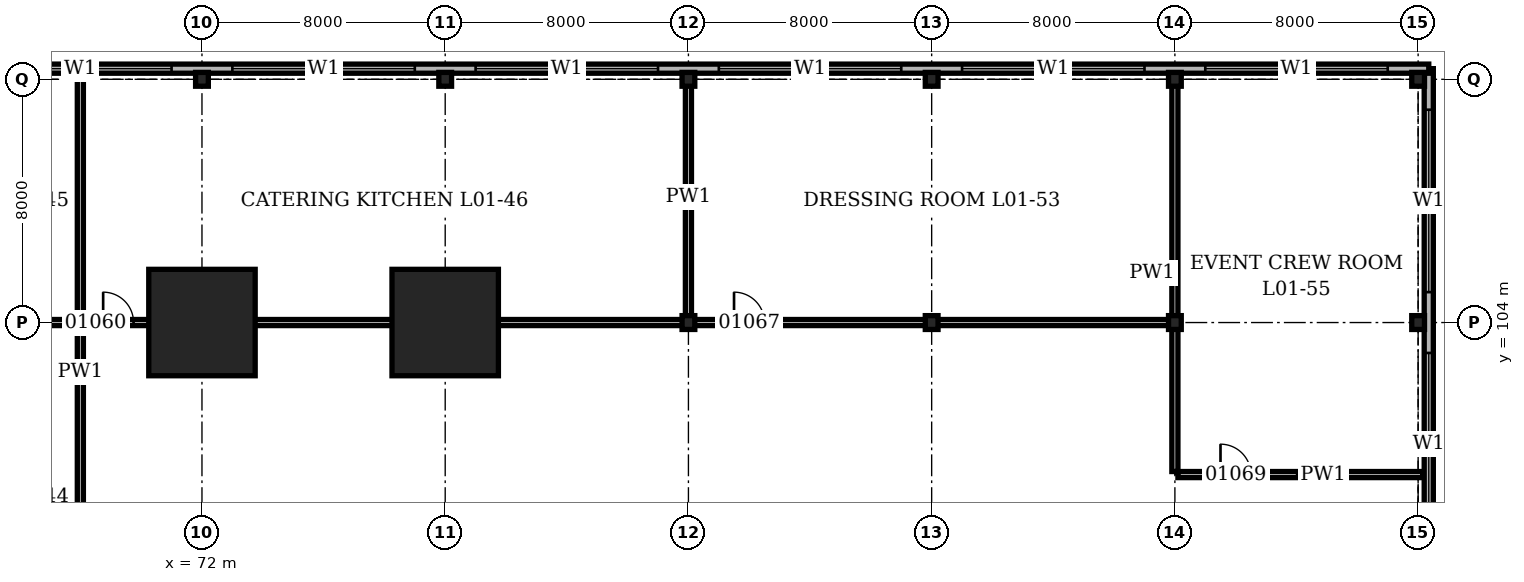
"""IFC4 building model, lengths in metres.
Left out: names, types, materials, properties, quantities, classifications, styles, units other than length and angle.
Written with IfcOpenShell. Run it as: python <this file> out.ifc"""

import sys

from ifc_helpers import new_model, si_unit, direction, frame, frame_2d, origin, origin_2d, place, context, subcontext, project, spatial, rectangle, hollow_rectangle, i_section, extrude, element, fill, save


model = new_model("IFC4")
c1 = context("Model", 3, precision=1e-05, world=origin(), true_north=direction((0.0, 1.0)))
c2 = subcontext(c1, "Body", "Model", "MODEL_VIEW")
j1 = project(units=[si_unit("LENGTHUNIT", "METRE"), si_unit("PLANEANGLEUNIT", "RADIAN")], contexts=[c1])
p1 = place(None, origin())
s1 = spatial("IfcSite", under=j1, at=p1, CompositionType="ELEMENT")
p2 = place(p1, origin())
s2 = spatial("IfcBuilding", under=s1, at=p2, CompositionType="ELEMENT")
p3 = place(p2, frame((0.0, 0.0, 4.9)))
s3 = spatial("IfcBuildingStorey", under=s2, at=p3, CompositionType="ELEMENT", Elevation=4.9)
p4 = place(p3, frame((72.0, 104.0, 0.0), z_axis=(0.0, 0.0, 1.0), x_axis=(1.0, 0.0, 0.0)))
e1 = element("IfcColumn", 1, at=p4, inside=s3, PredefinedType="COLUMN", context=c2, shape_type="SweptSolid", body=[
    extrude(hollow_rectangle(XDim=3.5, YDim=3.5, WallThickness=0.5, at=origin_2d()), origin(), (0.0, 0.0, 1.0), 5.0),
])
p5 = place(p3, frame((72.0, 112.0, 0.0), z_axis=(0.0, 0.0, 1.0), x_axis=(1.0, 0.0, 0.0)))
e2 = element("IfcColumn", 2, at=p5, inside=s3, PredefinedType="COLUMN", context=c2, shape_type="SweptSolid", body=[
    extrude(i_section(OverallWidth=0.419, OverallDepth=0.455, WebThickness=0.042, FlangeThickness=0.068, at=origin_2d()), origin(), (0.0, 0.0, 1.0), 5.0),
])
p6 = place(p3, frame((80.0, 104.0, 0.0), z_axis=(0.0, 0.0, 1.0), x_axis=(1.0, 0.0, 0.0)))
e3 = element("IfcColumn", 3, at=p6, inside=s3, PredefinedType="COLUMN", context=c2, shape_type="SweptSolid", body=[
    extrude(hollow_rectangle(XDim=3.5, YDim=3.5, WallThickness=0.5, at=origin_2d()), origin(), (0.0, 0.0, 1.0), 5.0),
])
for number, where, z_axis, x_axis in (
    (4, (80.0, 112.0, 0.0), (0.0, 0.0, 1.0), (1.0, 0.0, 0.0)),
    (5, (88.0, 104.0, 0.0), (0.0, 0.0, 1.0), (1.0, 0.0, 0.0)),
    (6, (88.0, 112.0, 0.0), (0.0, 0.0, 1.0), (1.0, 0.0, 0.0)),
    (7, (96.0, 104.0, 0.0), (0.0, 0.0, 1.0), (1.0, 0.0, 0.0)),
    (8, (96.0, 112.0, 0.0), (0.0, 0.0, 1.0), (1.0, 0.0, 0.0)),
    (9, (104.0, 104.0, 0.0), (0.0, 0.0, 1.0), (1.0, 0.0, 0.0)),
    (10, (104.0, 112.0, 0.0), (0.0, 0.0, 1.0), (1.0, 0.0, 0.0)),
    (11, (112.0, 104.0, 0.0), (0.0, 0.0, 1.0), (1.0, 0.0, 0.0)),
    (12, (112.0, 112.0, 0.0), (0.0, 0.0, 1.0), (1.0, 0.0, 0.0)),
):
    element("IfcColumn", number, at=place(p3, frame(where, z_axis=z_axis, x_axis=x_axis)), inside=s3, PredefinedType="COLUMN", context=c2, shape_type="SweptSolid", body=[
        extrude(i_section(OverallWidth=0.419, OverallDepth=0.455, WebThickness=0.042, FlangeThickness=0.068, at=origin_2d()), origin(), (0.0, 0.0, 1.0), 5.0),
    ])
p7 = place(p3, frame((112.35, -0.35, 0.0), z_axis=(0.0, 0.0, 1.0), x_axis=(0.0, 1.0, 0.0)))
e13 = element("IfcWall", 13, at=p7, inside=s3, PredefinedType="SOLIDWALL", context=c2, shape_type="SweptSolid", body=[
    extrude(rectangle(XDim=112.7, YDim=0.3, at=frame_2d((56.35, 0.0))), origin(), (0.0, 0.0, 1.0), 5.0),
])
p8 = place(p7, frame((1.35, 0.0, 1.0)))
e14 = element("IfcOpeningElement", 14, at=p8, cuts=e13, PredefinedType="OPENING", context=c2, shape_type="SweptSolid", body=[
    extrude(rectangle(XDim=6.0, YDim=1.5, at=frame_2d((3.0, 0.75))), frame((0.0, 0.16, 0.0), z_axis=(0.0, -1.0, 0.0), x_axis=(1.0, 0.0, 0.0)), (0.0, 0.0, 1.0), 0.32),
])
p9 = place(p7, frame((9.35, 0.0, 1.0)))
e15 = element("IfcOpeningElement", 15, at=p9, cuts=e13, PredefinedType="OPENING", context=c2, shape_type="SweptSolid", body=[
    extrude(rectangle(XDim=6.0, YDim=1.5, at=frame_2d((3.0, 0.75))), frame((0.0, 0.16, 0.0), z_axis=(0.0, -1.0, 0.0), x_axis=(1.0, 0.0, 0.0)), (0.0, 0.0, 1.0), 0.32),
])
p10 = place(p7, frame((17.35, 0.0, 1.0)))
e16 = element("IfcOpeningElement", 16, at=p10, cuts=e13, PredefinedType="OPENING", context=c2, shape_type="SweptSolid", body=[
    extrude(rectangle(XDim=6.0, YDim=1.5, at=frame_2d((3.0, 0.75))), frame((0.0, 0.16, 0.0), z_axis=(0.0, -1.0, 0.0), x_axis=(1.0, 0.0, 0.0)), (0.0, 0.0, 1.0), 0.32),
])
p11 = place(p7, frame((25.35, 0.0, 1.0)))
e17 = element("IfcOpeningElement", 17, at=p11, cuts=e13, PredefinedType="OPENING", context=c2, shape_type="SweptSolid", body=[
    extrude(rectangle(XDim=6.0, YDim=1.5, at=frame_2d((3.0, 0.75))), frame((0.0, 0.16, 0.0), z_axis=(0.0, -1.0, 0.0), x_axis=(1.0, 0.0, 0.0)), (0.0, 0.0, 1.0), 0.32),
])
p12 = place(p7, frame((33.35, 0.0, 1.0)))
e18 = element("IfcOpeningElement", 18, at=p12, cuts=e13, PredefinedType="OPENING", context=c2, shape_type="SweptSolid", body=[
    extrude(rectangle(XDim=6.0, YDim=1.5, at=frame_2d((3.0, 0.75))), frame((0.0, 0.16, 0.0), z_axis=(0.0, -1.0, 0.0), x_axis=(1.0, 0.0, 0.0)), (0.0, 0.0, 1.0), 0.32),
])
p13 = place(p7, frame((41.35, 0.0, 1.0)))
e19 = element("IfcOpeningElement", 19, at=p13, cuts=e13, PredefinedType="OPENING", context=c2, shape_type="SweptSolid", body=[
    extrude(rectangle(XDim=6.0, YDim=1.5, at=frame_2d((3.0, 0.75))), frame((0.0, 0.16, 0.0), z_axis=(0.0, -1.0, 0.0), x_axis=(1.0, 0.0, 0.0)), (0.0, 0.0, 1.0), 0.32),
])
p14 = place(p7, frame((49.35, 0.0, 1.0)))
e20 = element("IfcOpeningElement", 20, at=p14, cuts=e13, PredefinedType="OPENING", context=c2, shape_type="SweptSolid", body=[
    extrude(rectangle(XDim=6.0, YDim=1.5, at=frame_2d((3.0, 0.75))), frame((0.0, 0.16, 0.0), z_axis=(0.0, -1.0, 0.0), x_axis=(1.0, 0.0, 0.0)), (0.0, 0.0, 1.0), 0.32),
])
p15 = place(p7, frame((57.35, 0.0, 1.0)))
e21 = element("IfcOpeningElement", 21, at=p15, cuts=e13, PredefinedType="OPENING", context=c2, shape_type="SweptSolid", body=[
    extrude(rectangle(XDim=6.0, YDim=1.5, at=frame_2d((3.0, 0.75))), frame((0.0, 0.16, 0.0), z_axis=(0.0, -1.0, 0.0), x_axis=(1.0, 0.0, 0.0)), (0.0, 0.0, 1.0), 0.32),
])
p16 = place(p7, frame((65.35, 0.0, 1.0)))
e22 = element("IfcOpeningElement", 22, at=p16, cuts=e13, PredefinedType="OPENING", context=c2, shape_type="SweptSolid", body=[
    extrude(rectangle(XDim=6.0, YDim=1.5, at=frame_2d((3.0, 0.75))), frame((0.0, 0.16, 0.0), z_axis=(0.0, -1.0, 0.0), x_axis=(1.0, 0.0, 0.0)), (0.0, 0.0, 1.0), 0.32),
])
p17 = place(p7, frame((73.35, 0.0, 1.0)))
e23 = element("IfcOpeningElement", 23, at=p17, cuts=e13, PredefinedType="OPENING", context=c2, shape_type="SweptSolid", body=[
    extrude(rectangle(XDim=6.0, YDim=1.5, at=frame_2d((3.0, 0.75))), frame((0.0, 0.16, 0.0), z_axis=(0.0, -1.0, 0.0), x_axis=(1.0, 0.0, 0.0)), (0.0, 0.0, 1.0), 0.32),
])
p18 = place(p7, frame((81.35, 0.0, 1.0)))
e24 = element("IfcOpeningElement", 24, at=p18, cuts=e13, PredefinedType="OPENING", context=c2, shape_type="SweptSolid", body=[
    extrude(rectangle(XDim=6.0, YDim=1.5, at=frame_2d((3.0, 0.75))), frame((0.0, 0.16, 0.0), z_axis=(0.0, -1.0, 0.0), x_axis=(1.0, 0.0, 0.0)), (0.0, 0.0, 1.0), 0.32),
])
p19 = place(p7, frame((89.35, 0.0, 1.0)))
e25 = element("IfcOpeningElement", 25, at=p19, cuts=e13, PredefinedType="OPENING", context=c2, shape_type="SweptSolid", body=[
    extrude(rectangle(XDim=6.0, YDim=1.5, at=frame_2d((3.0, 0.75))), frame((0.0, 0.16, 0.0), z_axis=(0.0, -1.0, 0.0), x_axis=(1.0, 0.0, 0.0)), (0.0, 0.0, 1.0), 0.32),
])
p20 = place(p7, frame((97.35, 0.0, 1.0)))
e26 = element("IfcOpeningElement", 26, at=p20, cuts=e13, PredefinedType="OPENING", context=c2, shape_type="SweptSolid", body=[
    extrude(rectangle(XDim=6.0, YDim=1.5, at=frame_2d((3.0, 0.75))), frame((0.0, 0.16, 0.0), z_axis=(0.0, -1.0, 0.0), x_axis=(1.0, 0.0, 0.0)), (0.0, 0.0, 1.0), 0.32),
])
p21 = place(p7, frame((105.35, 0.0, 1.0)))
e27 = element("IfcOpeningElement", 27, at=p21, cuts=e13, PredefinedType="OPENING", context=c2, shape_type="SweptSolid", body=[
    extrude(rectangle(XDim=6.0, YDim=1.5, at=frame_2d((3.0, 0.75))), frame((0.0, 0.16, 0.0), z_axis=(0.0, -1.0, 0.0), x_axis=(1.0, 0.0, 0.0)), (0.0, 0.0, 1.0), 0.32),
])
p22 = place(p3, frame((112.35, 112.35, 0.0), z_axis=(0.0, 0.0, 1.0), x_axis=(-1.0, 0.0, 0.0)))
e28 = element("IfcWall", 28, at=p22, inside=s3, PredefinedType="SOLIDWALL", context=c2, shape_type="SweptSolid", body=[
    extrude(rectangle(XDim=112.7, YDim=0.3, at=frame_2d((56.35, 0.0))), origin(), (0.0, 0.0, 1.0), 5.0),
])
p23 = place(p22, frame((1.35, 0.0, 1.0)))
e29 = element("IfcOpeningElement", 29, at=p23, cuts=e28, PredefinedType="OPENING", context=c2, shape_type="SweptSolid", body=[
    extrude(rectangle(XDim=6.0, YDim=1.5, at=frame_2d((3.0, 0.75))), frame((0.0, 0.16, 0.0), z_axis=(0.0, -1.0, 0.0), x_axis=(1.0, 0.0, 0.0)), (0.0, 0.0, 1.0), 0.32),
])
p24 = place(p22, frame((9.35, 0.0, 1.0)))
e30 = element("IfcOpeningElement", 30, at=p24, cuts=e28, PredefinedType="OPENING", context=c2, shape_type="SweptSolid", body=[
    extrude(rectangle(XDim=6.0, YDim=1.5, at=frame_2d((3.0, 0.75))), frame((0.0, 0.16, 0.0), z_axis=(0.0, -1.0, 0.0), x_axis=(1.0, 0.0, 0.0)), (0.0, 0.0, 1.0), 0.32),
])
p25 = place(p22, frame((17.35, 0.0, 1.0)))
e31 = element("IfcOpeningElement", 31, at=p25, cuts=e28, PredefinedType="OPENING", context=c2, shape_type="SweptSolid", body=[
    extrude(rectangle(XDim=6.0, YDim=1.5, at=frame_2d((3.0, 0.75))), frame((0.0, 0.16, 0.0), z_axis=(0.0, -1.0, 0.0), x_axis=(1.0, 0.0, 0.0)), (0.0, 0.0, 1.0), 0.32),
])
p26 = place(p22, frame((25.35, 0.0, 1.0)))
e32 = element("IfcOpeningElement", 32, at=p26, cuts=e28, PredefinedType="OPENING", context=c2, shape_type="SweptSolid", body=[
    extrude(rectangle(XDim=6.0, YDim=1.5, at=frame_2d((3.0, 0.75))), frame((0.0, 0.16, 0.0), z_axis=(0.0, -1.0, 0.0), x_axis=(1.0, 0.0, 0.0)), (0.0, 0.0, 1.0), 0.32),
])
p27 = place(p22, frame((33.35, 0.0, 1.0)))
e33 = element("IfcOpeningElement", 33, at=p27, cuts=e28, PredefinedType="OPENING", context=c2, shape_type="SweptSolid", body=[
    extrude(rectangle(XDim=6.0, YDim=1.5, at=frame_2d((3.0, 0.75))), frame((0.0, 0.16, 0.0), z_axis=(0.0, -1.0, 0.0), x_axis=(1.0, 0.0, 0.0)), (0.0, 0.0, 1.0), 0.32),
])
p28 = place(p22, frame((41.35, 0.0, 1.0)))
e34 = element("IfcOpeningElement", 34, at=p28, cuts=e28, PredefinedType="OPENING", context=c2, shape_type="SweptSolid", body=[
    extrude(rectangle(XDim=6.0, YDim=1.5, at=frame_2d((3.0, 0.75))), frame((0.0, 0.16, 0.0), z_axis=(0.0, -1.0, 0.0), x_axis=(1.0, 0.0, 0.0)), (0.0, 0.0, 1.0), 0.32),
])
p29 = place(p22, frame((49.35, 0.0, 1.0)))
e35 = element("IfcOpeningElement", 35, at=p29, cuts=e28, PredefinedType="OPENING", context=c2, shape_type="SweptSolid", body=[
    extrude(rectangle(XDim=6.0, YDim=1.5, at=frame_2d((3.0, 0.75))), frame((0.0, 0.16, 0.0), z_axis=(0.0, -1.0, 0.0), x_axis=(1.0, 0.0, 0.0)), (0.0, 0.0, 1.0), 0.32),
])
p30 = place(p22, frame((57.35, 0.0, 1.0)))
e36 = element("IfcOpeningElement", 36, at=p30, cuts=e28, PredefinedType="OPENING", context=c2, shape_type="SweptSolid", body=[
    extrude(rectangle(XDim=6.0, YDim=1.5, at=frame_2d((3.0, 0.75))), frame((0.0, 0.16, 0.0), z_axis=(0.0, -1.0, 0.0), x_axis=(1.0, 0.0, 0.0)), (0.0, 0.0, 1.0), 0.32),
])
p31 = place(p22, frame((65.35, 0.0, 1.0)))
e37 = element("IfcOpeningElement", 37, at=p31, cuts=e28, PredefinedType="OPENING", context=c2, shape_type="SweptSolid", body=[
    extrude(rectangle(XDim=6.0, YDim=1.5, at=frame_2d((3.0, 0.75))), frame((0.0, 0.16, 0.0), z_axis=(0.0, -1.0, 0.0), x_axis=(1.0, 0.0, 0.0)), (0.0, 0.0, 1.0), 0.32),
])
p32 = place(p22, frame((73.35, 0.0, 1.0)))
e38 = element("IfcOpeningElement", 38, at=p32, cuts=e28, PredefinedType="OPENING", context=c2, shape_type="SweptSolid", body=[
    extrude(rectangle(XDim=6.0, YDim=1.5, at=frame_2d((3.0, 0.75))), frame((0.0, 0.16, 0.0), z_axis=(0.0, -1.0, 0.0), x_axis=(1.0, 0.0, 0.0)), (0.0, 0.0, 1.0), 0.32),
])
p33 = place(p22, frame((81.35, 0.0, 1.0)))
e39 = element("IfcOpeningElement", 39, at=p33, cuts=e28, PredefinedType="OPENING", context=c2, shape_type="SweptSolid", body=[
    extrude(rectangle(XDim=6.0, YDim=1.5, at=frame_2d((3.0, 0.75))), frame((0.0, 0.16, 0.0), z_axis=(0.0, -1.0, 0.0), x_axis=(1.0, 0.0, 0.0)), (0.0, 0.0, 1.0), 0.32),
])
p34 = place(p22, frame((89.35, 0.0, 1.0)))
e40 = element("IfcOpeningElement", 40, at=p34, cuts=e28, PredefinedType="OPENING", context=c2, shape_type="SweptSolid", body=[
    extrude(rectangle(XDim=6.0, YDim=1.5, at=frame_2d((3.0, 0.75))), frame((0.0, 0.16, 0.0), z_axis=(0.0, -1.0, 0.0), x_axis=(1.0, 0.0, 0.0)), (0.0, 0.0, 1.0), 0.32),
])
p35 = place(p22, frame((97.35, 0.0, 1.0)))
e41 = element("IfcOpeningElement", 41, at=p35, cuts=e28, PredefinedType="OPENING", context=c2, shape_type="SweptSolid", body=[
    extrude(rectangle(XDim=6.0, YDim=1.5, at=frame_2d((3.0, 0.75))), frame((0.0, 0.16, 0.0), z_axis=(0.0, -1.0, 0.0), x_axis=(1.0, 0.0, 0.0)), (0.0, 0.0, 1.0), 0.32),
])
p36 = place(p22, frame((105.35, 0.0, 1.0)))
e42 = element("IfcOpeningElement", 42, at=p36, cuts=e28, PredefinedType="OPENING", context=c2, shape_type="SweptSolid", body=[
    extrude(rectangle(XDim=6.0, YDim=1.5, at=frame_2d((3.0, 0.75))), frame((0.0, 0.16, 0.0), z_axis=(0.0, -1.0, 0.0), x_axis=(1.0, 0.0, 0.0)), (0.0, 0.0, 1.0), 0.32),
])
p37 = place(p3, frame((104.1, 99.0, 0.0), z_axis=(0.0, 0.0, 1.0), x_axis=(1.0, 0.0, 0.0)))
e43 = element("IfcWall", 43, at=p37, inside=s3, PredefinedType="PARTITIONING", context=c2, shape_type="SweptSolid", body=[
    extrude(rectangle(XDim=8.05, YDim=0.2, at=frame_2d((4.025, 0.0))), origin(), (0.0, 0.0, 1.0), 4.8),
])
p38 = place(p37, frame((1.4, 0.0, 0.0)))
e44 = element("IfcOpeningElement", 44, at=p38, cuts=e43, PredefinedType="OPENING", context=c2, shape_type="SweptSolid", body=[
    extrude(rectangle(XDim=1.0, YDim=2.1, at=frame_2d((0.5, 1.05))), frame((0.0, 0.11, 0.0), z_axis=(0.0, -1.0, 0.0), x_axis=(1.0, 0.0, 0.0)), (0.0, 0.0, 1.0), 0.22),
])
p39 = place(p3, frame((24.1, 104.0, 0.0), z_axis=(0.0, 0.0, 1.0), x_axis=(1.0, 0.0, 0.0)))
e45 = element("IfcWall", 45, at=p39, inside=s3, PredefinedType="PARTITIONING", context=c2, shape_type="SweptSolid", body=[
    extrude(rectangle(XDim=79.8, YDim=0.2, at=frame_2d((39.9, 0.0))), origin(), (0.0, 0.0, 1.0), 4.028),
])
p40 = place(p39, frame((1.0, 0.0, 0.0)))
e46 = element("IfcOpeningElement", 46, at=p40, cuts=e45, PredefinedType="OPENING", context=c2, shape_type="SweptSolid", body=[
    extrude(rectangle(XDim=1.8, YDim=2.4, at=frame_2d((0.9, 1.2))), frame((0.0, 0.11, 0.0), z_axis=(0.0, -1.0, 0.0), x_axis=(1.0, 0.0, 0.0)), (0.0, 0.0, 1.0), 0.22),
])
p41 = place(p39, frame((20.65, 0.0, 0.0)))
e47 = element("IfcOpeningElement", 47, at=p41, cuts=e45, PredefinedType="OPENING", context=c2, shape_type="SweptSolid", body=[
    extrude(rectangle(XDim=1.0, YDim=2.1, at=frame_2d((0.5, 1.05))), frame((0.0, 0.11, 0.0), z_axis=(0.0, -1.0, 0.0), x_axis=(1.0, 0.0, 0.0)), (0.0, 0.0, 1.0), 0.22),
])
p42 = place(p39, frame((34.15, 0.0, 0.0)))
e48 = element("IfcOpeningElement", 48, at=p42, cuts=e45, PredefinedType="OPENING", context=c2, shape_type="SweptSolid", body=[
    extrude(rectangle(XDim=1.0, YDim=2.1, at=frame_2d((0.5, 1.05))), frame((0.0, 0.11, 0.0), z_axis=(0.0, -1.0, 0.0), x_axis=(1.0, 0.0, 0.0)), (0.0, 0.0, 1.0), 0.22),
])
p43 = place(p39, frame((44.65, 0.0, 0.0)))
e49 = element("IfcOpeningElement", 49, at=p43, cuts=e45, PredefinedType="OPENING", context=c2, shape_type="SweptSolid", body=[
    extrude(rectangle(XDim=1.0, YDim=2.1, at=frame_2d((0.5, 1.05))), frame((0.0, 0.11, 0.0), z_axis=(0.0, -1.0, 0.0), x_axis=(1.0, 0.0, 0.0)), (0.0, 0.0, 1.0), 0.22),
])
p44 = place(p39, frame((65.4, 0.0, 0.0)))
e50 = element("IfcOpeningElement", 50, at=p44, cuts=e45, PredefinedType="OPENING", context=c2, shape_type="SweptSolid", body=[
    extrude(rectangle(XDim=1.0, YDim=2.1, at=frame_2d((0.5, 1.05))), frame((0.0, 0.11, 0.0), z_axis=(0.0, -1.0, 0.0), x_axis=(1.0, 0.0, 0.0)), (0.0, 0.0, 1.0), 0.22),
])
p45 = place(p3, frame((68.0, 92.6, 0.0), z_axis=(0.0, 0.0, 1.0), x_axis=(0.0, 1.0, 0.0)))
e51 = element("IfcWall", 51, at=p45, inside=s3, PredefinedType="PARTITIONING", context=c2, shape_type="SweptSolid", body=[
    extrude(rectangle(XDim=19.55, YDim=0.2, at=frame_2d((9.775, 0.0))), origin(), (0.0, 0.0, 1.0), 4.8),
])
p46 = place(p3, frame((88.0, 104.1, 0.0), z_axis=(0.0, 0.0, 1.0), x_axis=(0.0, 1.0, 0.0)))
e52 = element("IfcWall", 52, at=p46, inside=s3, PredefinedType="PARTITIONING", context=c2, shape_type="SweptSolid", body=[
    extrude(rectangle(XDim=8.05, YDim=0.2, at=frame_2d((4.025, 0.0))), origin(), (0.0, 0.0, 1.0), 4.028),
])
p47 = place(p3, frame((104.0, 99.1, 0.0), z_axis=(0.0, 0.0, 1.0), x_axis=(0.0, 1.0, 0.0)))
e53 = element("IfcWall", 53, at=p47, inside=s3, PredefinedType="PARTITIONING", context=c2, shape_type="SweptSolid", body=[
    extrude(rectangle(XDim=13.05, YDim=0.2, at=frame_2d((6.525, 0.0))), origin(), (0.0, 0.0, 1.0), 4.028),
])
p48 = place(p20, origin())
e54 = element("IfcWindow", 54, at=p48, inside=s3, PartitioningType="SINGLE_PANEL", PredefinedType="WINDOW", context=c2, shape_type="SweptSolid", body=[
    extrude(rectangle(XDim=6.0, YDim=1.5, at=frame_2d((3.0, 0.75))), frame((0.0, 0.03, 0.0), z_axis=(0.0, -1.0, 0.0), x_axis=(1.0, 0.0, 0.0)), (0.0, 0.0, 1.0), 0.06),
])
fill(e26, e54)
p49 = place(p21, origin())
e55 = element("IfcWindow", 55, at=p49, inside=s3, PartitioningType="SINGLE_PANEL", PredefinedType="WINDOW", context=c2, shape_type="SweptSolid", body=[
    extrude(rectangle(XDim=6.0, YDim=1.5, at=frame_2d((3.0, 0.75))), frame((0.0, 0.03, 0.0), z_axis=(0.0, -1.0, 0.0), x_axis=(1.0, 0.0, 0.0)), (0.0, 0.0, 1.0), 0.06),
])
fill(e27, e55)
p50 = place(p23, origin())
e56 = element("IfcWindow", 56, at=p50, inside=s3, PartitioningType="SINGLE_PANEL", PredefinedType="WINDOW", context=c2, shape_type="SweptSolid", body=[
    extrude(rectangle(XDim=6.0, YDim=1.5, at=frame_2d((3.0, 0.75))), frame((0.0, 0.03, 0.0), z_axis=(0.0, -1.0, 0.0), x_axis=(1.0, 0.0, 0.0)), (0.0, 0.0, 1.0), 0.06),
])
fill(e29, e56)
p51 = place(p24, origin())
e57 = element("IfcWindow", 57, at=p51, inside=s3, PartitioningType="SINGLE_PANEL", PredefinedType="WINDOW", context=c2, shape_type="SweptSolid", body=[
    extrude(rectangle(XDim=6.0, YDim=1.5, at=frame_2d((3.0, 0.75))), frame((0.0, 0.03, 0.0), z_axis=(0.0, -1.0, 0.0), x_axis=(1.0, 0.0, 0.0)), (0.0, 0.0, 1.0), 0.06),
])
fill(e30, e57)
p52 = place(p25, origin())
e58 = element("IfcWindow", 58, at=p52, inside=s3, PartitioningType="SINGLE_PANEL", PredefinedType="WINDOW", context=c2, shape_type="SweptSolid", body=[
    extrude(rectangle(XDim=6.0, YDim=1.5, at=frame_2d((3.0, 0.75))), frame((0.0, 0.03, 0.0), z_axis=(0.0, -1.0, 0.0), x_axis=(1.0, 0.0, 0.0)), (0.0, 0.0, 1.0), 0.06),
])
fill(e31, e58)
p53 = place(p26, origin())
e59 = element("IfcWindow", 59, at=p53, inside=s3, PartitioningType="SINGLE_PANEL", PredefinedType="WINDOW", context=c2, shape_type="SweptSolid", body=[
    extrude(rectangle(XDim=6.0, YDim=1.5, at=frame_2d((3.0, 0.75))), frame((0.0, 0.03, 0.0), z_axis=(0.0, -1.0, 0.0), x_axis=(1.0, 0.0, 0.0)), (0.0, 0.0, 1.0), 0.06),
])
fill(e32, e59)
p54 = place(p27, origin())
e60 = element("IfcWindow", 60, at=p54, inside=s3, PartitioningType="SINGLE_PANEL", PredefinedType="WINDOW", context=c2, shape_type="SweptSolid", body=[
    extrude(rectangle(XDim=6.0, YDim=1.5, at=frame_2d((3.0, 0.75))), frame((0.0, 0.03, 0.0), z_axis=(0.0, -1.0, 0.0), x_axis=(1.0, 0.0, 0.0)), (0.0, 0.0, 1.0), 0.06),
])
fill(e33, e60)
p55 = place(p28, origin())
e61 = element("IfcWindow", 61, at=p55, inside=s3, PartitioningType="SINGLE_PANEL", PredefinedType="WINDOW", context=c2, shape_type="SweptSolid", body=[
    extrude(rectangle(XDim=6.0, YDim=1.5, at=frame_2d((3.0, 0.75))), frame((0.0, 0.03, 0.0), z_axis=(0.0, -1.0, 0.0), x_axis=(1.0, 0.0, 0.0)), (0.0, 0.0, 1.0), 0.06),
])
fill(e34, e61)
p56 = place(p43, origin())
e62 = element("IfcDoor", 62, at=p56, inside=s3, OperationType="SINGLE_SWING_LEFT", PredefinedType="DOOR", context=c2, shape_type="SweptSolid", body=[
    extrude(rectangle(XDim=1.0, YDim=2.1, at=frame_2d((0.5, 1.05))), frame((0.0, 0.1, 0.0), z_axis=(0.0, -1.0, 0.0), x_axis=(1.0, 0.0, 0.0)), (0.0, 0.0, 1.0), 0.199),
])
fill(e49, e62)
p57 = place(p44, origin())
e63 = element("IfcDoor", 63, at=p57, inside=s3, OperationType="SINGLE_SWING_LEFT", PredefinedType="DOOR", context=c2, shape_type="SweptSolid", body=[
    extrude(rectangle(XDim=1.0, YDim=2.1, at=frame_2d((0.5, 1.05))), frame((0.0, 0.1, 0.0), z_axis=(0.0, -1.0, 0.0), x_axis=(1.0, 0.0, 0.0)), (0.0, 0.0, 1.0), 0.199),
])
fill(e50, e63)
p58 = place(p38, origin())
e64 = element("IfcDoor", 64, at=p58, inside=s3, OperationType="SINGLE_SWING_LEFT", PredefinedType="DOOR", context=c2, shape_type="SweptSolid", body=[
    extrude(rectangle(XDim=1.0, YDim=2.1, at=frame_2d((0.5, 1.05))), frame((0.0, 0.1, 0.0), z_axis=(0.0, -1.0, 0.0), x_axis=(1.0, 0.0, 0.0)), (0.0, 0.0, 1.0), 0.199),
])
fill(e44, e64)
save(model, sys.argv[1])
